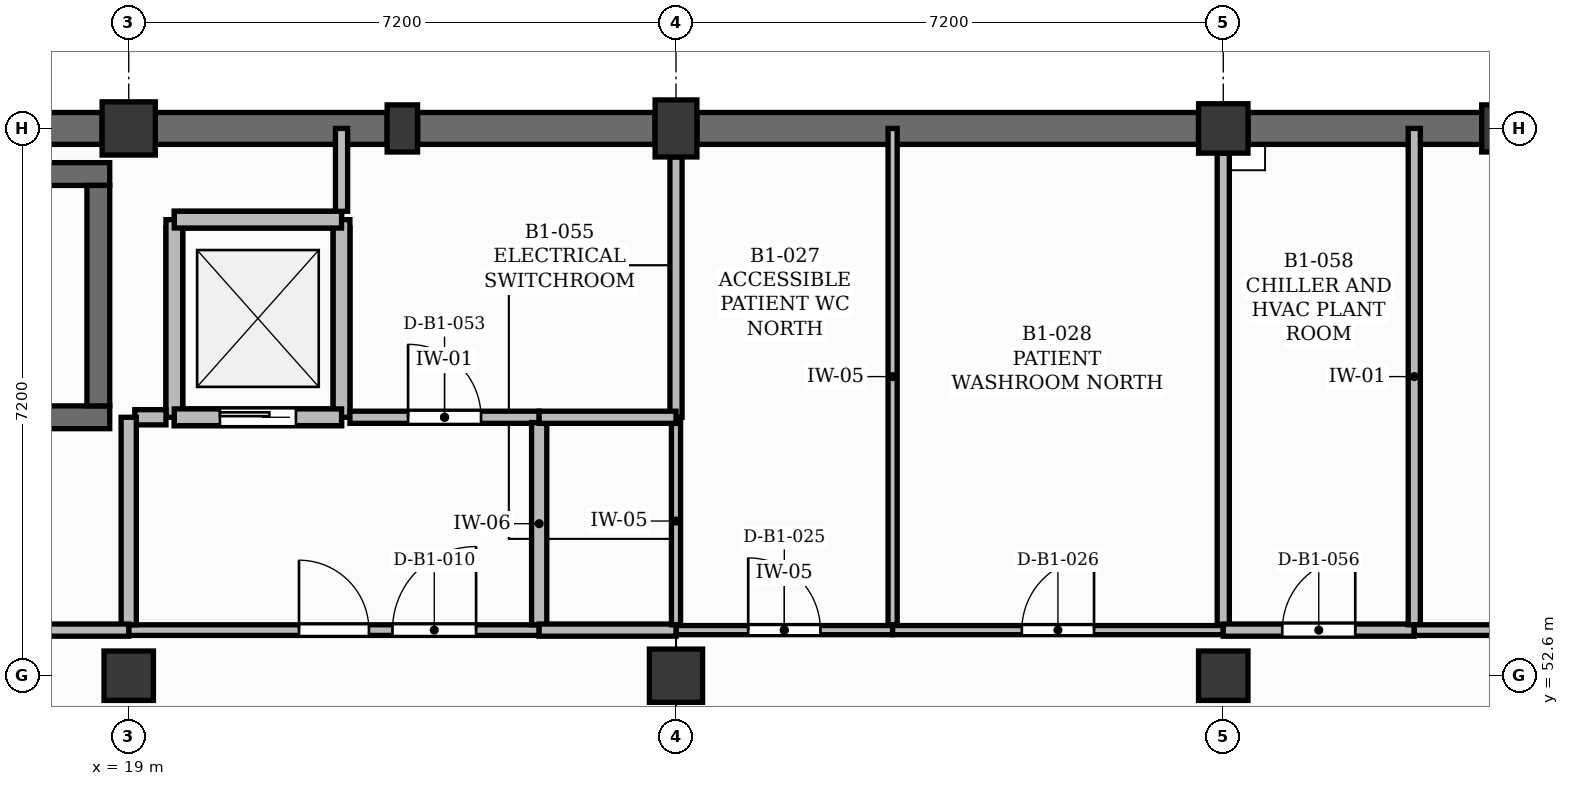
"""IFC4 building model, lengths in metres.
Left out: names, types, materials, properties, quantities, classifications, styles, units other than length and angle.
Written with IfcOpenShell. Run it as: python <this file> out.ifc"""

import sys

from ifc_helpers import new_model, si_unit, direction, frame, frame_2d, origin, origin_2d, place, context, subcontext, project, spatial, rectangle, extrude, element, fill, save


model = new_model("IFC4")
c1 = context("Model", 3, precision=1e-05, world=origin(), true_north=direction((0.0, 1.0)))
c2 = subcontext(c1, "Body", "Model", "MODEL_VIEW")
j1 = project(units=[si_unit("LENGTHUNIT", "METRE"), si_unit("PLANEANGLEUNIT", "RADIAN")], contexts=[c1])
p1 = place(None, origin())
s1 = spatial("IfcSite", under=j1, at=p1, CompositionType="ELEMENT")
p2 = place(p1, origin())
s2 = spatial("IfcBuilding", under=s1, at=p2, CompositionType="ELEMENT")
p3 = place(p2, frame((0.0, 0.0, -4.5)))
s3 = spatial("IfcBuildingStorey", under=s2, at=p3, CompositionType="ELEMENT", Elevation=-4.5)
p4 = place(p3, frame((19.0, 52.6, 0.0), z_axis=(0.0, 0.0, 1.0), x_axis=(1.0, 0.0, 0.0)))
e1 = element("IfcColumn", 1, at=p4, inside=s3, PredefinedType="COLUMN", context=c2, shape_type="SweptSolid", body=[
    extrude(rectangle(XDim=0.65, YDim=0.65, at=origin_2d()), origin(), (0.0, 0.0, 1.0), 4.2),
])
for number, where, z_axis, x_axis in (
    (2, (19.0, 59.8, 0.0), (0.0, 0.0, 1.0), (1.0, 0.0, 0.0)),
    (3, (26.2, 52.6, 0.0), (0.0, 0.0, 1.0), (1.0, 0.0, 0.0)),
):
    element("IfcColumn", number, at=place(p3, frame(where, z_axis=z_axis, x_axis=x_axis)), inside=s3, PredefinedType="COLUMN", context=c2, shape_type="SweptSolid", body=[
        extrude(rectangle(XDim=0.7, YDim=0.7, at=origin_2d()), origin(), (0.0, 0.0, 1.0), 4.2),
    ])
p5 = place(p3, frame((26.2, 59.8, 0.0), z_axis=(0.0, 0.0, 1.0), x_axis=(1.0, 0.0, 0.0)))
e4 = element("IfcColumn", 4, at=p5, inside=s3, PredefinedType="COLUMN", context=c2, shape_type="SweptSolid", body=[
    extrude(rectangle(XDim=0.55, YDim=0.75, at=origin_2d()), origin(), (0.0, 0.0, 1.0), 4.2),
])
for number, where, z_axis, x_axis in (
    (5, (33.4, 52.6, 0.0), (0.0, 0.0, 1.0), (1.0, 0.0, 0.0)),
    (6, (33.4, 59.8, 0.0), (0.0, 0.0, 1.0), (1.0, 0.0, 0.0)),
):
    element("IfcColumn", number, at=place(p3, frame(where, z_axis=z_axis, x_axis=x_axis)), inside=s3, PredefinedType="COLUMN", context=c2, shape_type="SweptSolid", body=[
        extrude(rectangle(XDim=0.65, YDim=0.65, at=origin_2d()), origin(), (0.0, 0.0, 1.0), 4.2),
    ])
for number, where, z_axis, x_axis in (
    (7, (22.6, 59.8, 0.0), (0.0, 0.0, 1.0), (1.0, 0.0, 0.0)),
    (8, (37.0, 59.8, 0.0), (0.0, 0.0, 1.0), (1.0, 0.0, 0.0)),
):
    element("IfcColumn", number, at=place(p3, frame(where, z_axis=z_axis, x_axis=x_axis)), inside=s3, PredefinedType="PILASTER", context=c2, shape_type="SweptSolid", body=[
        extrude(rectangle(XDim=0.4, YDim=0.62, at=origin_2d()), origin(), (0.0, 0.0, 1.0), 4.2),
    ])
p6 = place(p3, frame((12.075, 59.8, 0.0), z_axis=(0.0, 0.0, 1.0), x_axis=(1.0, 0.0, 0.0)))
e9 = element("IfcWall", 9, at=p6, inside=s3, PredefinedType="USERDEFINED", context=c2, shape_type="SweptSolid", body=[
    extrude(rectangle(XDim=6.575, YDim=0.42, at=frame_2d((3.288, 0.0))), origin(), (0.0, 0.0, 1.0), 4.2),
])
p7 = place(p3, frame((19.35, 59.8, 0.0), z_axis=(0.0, 0.0, 1.0), x_axis=(1.0, 0.0, 0.0)))
e10 = element("IfcWall", 10, at=p7, inside=s3, PredefinedType="USERDEFINED", context=c2, shape_type="SweptSolid", body=[
    extrude(rectangle(XDim=3.05, YDim=0.42, at=frame_2d((1.525, 0.0))), origin(), (0.0, 0.0, 1.0), 4.2),
])
p8 = place(p3, frame((22.8, 59.8, 0.0), z_axis=(0.0, 0.0, 1.0), x_axis=(1.0, 0.0, 0.0)))
e11 = element("IfcWall", 11, at=p8, inside=s3, PredefinedType="USERDEFINED", context=c2, shape_type="SweptSolid", body=[
    extrude(rectangle(XDim=3.125, YDim=0.42, at=frame_2d((1.562, 0.0))), origin(), (0.0, 0.0, 1.0), 4.2),
])
p9 = place(p3, frame((26.475, 59.8, 0.0), z_axis=(0.0, 0.0, 1.0), x_axis=(1.0, 0.0, 0.0)))
e12 = element("IfcWall", 12, at=p9, inside=s3, PredefinedType="USERDEFINED", context=c2, shape_type="SweptSolid", body=[
    extrude(rectangle(XDim=6.6, YDim=0.42, at=frame_2d((3.3, 0.0))), origin(), (0.0, 0.0, 1.0), 4.2),
])
p10 = place(p3, frame((33.725, 59.8, 0.0), z_axis=(0.0, 0.0, 1.0), x_axis=(1.0, 0.0, 0.0)))
e13 = element("IfcWall", 13, at=p10, inside=s3, PredefinedType="USERDEFINED", context=c2, shape_type="SweptSolid", body=[
    extrude(rectangle(XDim=3.075, YDim=0.42, at=frame_2d((1.538, 0.0))), origin(), (0.0, 0.0, 1.0), 4.2),
])
for number, where, z_axis, x_axis in (
    (14, (12.05, 56.0, 0.0), (0.0, 0.0, 1.0), (1.0, 0.0, 0.0)),
    (15, (12.05, 59.2, 0.0), (0.0, 0.0, 1.0), (1.0, 0.0, 0.0)),
):
    element("IfcWall", number, at=place(p3, frame(where, z_axis=z_axis, x_axis=x_axis)), inside=s3, PredefinedType="SHEAR", context=c2, shape_type="SweptSolid", body=[
        extrude(rectangle(XDim=6.7, YDim=0.3, at=frame_2d((3.35, 0.0))), origin(), (0.0, 0.0, 1.0), 4.25),
    ])
p11 = place(p3, frame((18.6, 56.15, 0.0), z_axis=(0.0, 0.0, 1.0), x_axis=(0.0, 1.0, 0.0)))
e16 = element("IfcWall", 16, at=p11, inside=s3, PredefinedType="SHEAR", context=c2, shape_type="SweptSolid", body=[
    extrude(rectangle(XDim=2.9, YDim=0.3, at=frame_2d((1.45, 0.0))), origin(), (0.0, 0.0, 1.0), 4.25),
])
p12 = place(p3, frame((19.6, 56.0, 0.0), z_axis=(0.0, 0.0, 1.0), x_axis=(1.0, 0.0, 0.0)))
e17 = element("IfcWall", 17, at=p12, inside=s3, PredefinedType="SOLIDWALL", context=c2, shape_type="SweptSolid", body=[
    extrude(rectangle(XDim=2.2, YDim=0.22, at=frame_2d((1.1, 0.0))), origin(), (0.0, 0.0, 1.0), 4.25),
])
p13 = place(p12, frame((0.6, 0.0, 0.0)))
e18 = element("IfcOpeningElement", 18, at=p13, cuts=e17, PredefinedType="OPENING", context=c2, shape_type="SweptSolid", body=[
    extrude(rectangle(XDim=1.0, YDim=2.15, at=frame_2d((0.5, 1.075))), frame((0.0, 0.12, 0.0), z_axis=(0.0, -1.0, 0.0), x_axis=(1.0, 0.0, 0.0)), (0.0, 0.0, 1.0), 0.24),
])
p14 = place(p3, frame((19.6, 58.6, 0.0), z_axis=(0.0, 0.0, 1.0), x_axis=(1.0, 0.0, 0.0)))
e19 = element("IfcWall", 19, at=p14, inside=s3, PredefinedType="SOLIDWALL", context=c2, shape_type="SweptSolid", body=[
    extrude(rectangle(XDim=2.2, YDim=0.22, at=frame_2d((1.1, 0.0))), origin(), (0.0, 0.0, 1.0), 4.25),
])
for number, where, z_axis, x_axis in (
    (20, (19.6, 56.11, 0.0), (0.0, 0.0, 1.0), (0.0, 1.0, 0.0)),
    (21, (21.8, 56.11, 0.0), (0.0, 0.0, 1.0), (0.0, 1.0, 0.0)),
):
    element("IfcWall", number, at=place(p3, frame(where, z_axis=z_axis, x_axis=x_axis)), inside=s3, PredefinedType="SOLIDWALL", context=c2, shape_type="SweptSolid", body=[
        extrude(rectangle(XDim=2.38, YDim=0.22, at=frame_2d((1.19, 0.0))), origin(), (0.0, 0.0, 1.0), 4.25),
    ])
for number, where, z_axis, x_axis in (
    (22, (19.6, 56.0, -0.9), (0.0, 0.0, 1.0), (0.0, 1.0, 0.0)),
    (23, (21.8, 56.0, -0.9), (0.0, 0.0, 1.0), (0.0, 1.0, 0.0)),
):
    element("IfcWall", number, at=place(p3, frame(where, z_axis=z_axis, x_axis=x_axis)), inside=s3, PredefinedType="SOLIDWALL", context=c2, shape_type="SweptSolid", body=[
        extrude(rectangle(XDim=2.6, YDim=0.22, at=frame_2d((1.3, 0.0))), origin(), (0.0, 0.0, 1.0), 0.9),
    ])
for number, where, z_axis, x_axis in (
    (24, (19.6, 56.0, -0.9), (0.0, 0.0, 1.0), (1.0, 0.0, 0.0)),
    (25, (19.6, 58.6, -0.9), (0.0, 0.0, 1.0), (1.0, 0.0, 0.0)),
):
    element("IfcWall", number, at=place(p3, frame(where, z_axis=z_axis, x_axis=x_axis)), inside=s3, PredefinedType="SOLIDWALL", context=c2, shape_type="SweptSolid", body=[
        extrude(rectangle(XDim=2.2, YDim=0.22, at=frame_2d((1.1, 0.0))), origin(), (0.0, 0.0, 1.0), 0.9),
    ])
p15 = place(p3, frame((19.0, 53.2, 0.0), z_axis=(0.0, 0.0, 1.0), x_axis=(1.0, 0.0, 0.0)))
e26 = element("IfcWall", 26, at=p15, inside=s3, PredefinedType="PARTITIONING", context=c2, shape_type="SweptSolid", body=[
    extrude(rectangle(XDim=5.4, YDim=0.14, at=frame_2d((2.7, 0.0))), origin(), (0.0, 0.0, 1.0), 4.08),
])
p16 = place(p15, frame((2.24, 0.0, 0.0)))
e27 = element("IfcOpeningElement", 27, at=p16, cuts=e26, PredefinedType="OPENING", context=c2, shape_type="SweptSolid", body=[
    extrude(rectangle(XDim=0.92, YDim=2.1, at=frame_2d((0.46, 1.05))), frame((0.0, 0.08, 0.0), z_axis=(0.0, -1.0, 0.0), x_axis=(1.0, 0.0, 0.0)), (0.0, 0.0, 1.0), 0.16),
])
p17 = place(p15, frame((3.47, 0.0, 0.0)))
e28 = element("IfcOpeningElement", 28, at=p17, cuts=e26, PredefinedType="OPENING", context=c2, shape_type="SweptSolid", body=[
    extrude(rectangle(XDim=1.1, YDim=2.1, at=frame_2d((0.55, 1.05))), frame((0.0, 0.08, 0.0), z_axis=(0.0, -1.0, 0.0), x_axis=(1.0, 0.0, 0.0)), (0.0, 0.0, 1.0), 0.16),
])
p18 = place(p3, frame((21.91, 56.0, 0.0), z_axis=(0.0, 0.0, 1.0), x_axis=(1.0, 0.0, 0.0)))
e29 = element("IfcWall", 29, at=p18, inside=s3, PredefinedType="PARTITIONING", context=c2, shape_type="SweptSolid", body=[
    extrude(rectangle(XDim=2.49, YDim=0.16, at=frame_2d((1.245, 0.0))), origin(), (0.0, 0.0, 1.0), 4.08),
])
p19 = place(p18, frame((0.765, 0.0, 0.0)))
e30 = element("IfcOpeningElement", 30, at=p19, cuts=e29, PredefinedType="OPENING", context=c2, shape_type="SweptSolid", body=[
    extrude(rectangle(XDim=0.96, YDim=2.1, at=frame_2d((0.48, 1.05))), frame((0.0, 0.09, 0.0), z_axis=(0.0, -1.0, 0.0), x_axis=(1.0, 0.0, 0.0)), (0.0, 0.0, 1.0), 0.18),
])
p20 = place(p3, frame((26.2, 53.2, 0.0), z_axis=(0.0, 0.0, 1.0), x_axis=(1.0, 0.0, 0.0)))
e31 = element("IfcWall", 31, at=p20, inside=s3, PredefinedType="PLUMBINGWALL", context=c2, shape_type="SweptSolid", body=[
    extrude(rectangle(XDim=2.85, YDim=0.12, at=frame_2d((1.425, 0.0))), origin(), (0.0, 0.0, 1.0), 4.08),
])
p21 = place(p20, frame((0.95, 0.0, 0.0)))
e32 = element("IfcOpeningElement", 32, at=p21, cuts=e31, PredefinedType="OPENING", context=c2, shape_type="SweptSolid", body=[
    extrude(rectangle(XDim=0.95, YDim=2.1, at=frame_2d((0.475, 1.05))), frame((0.0, 0.07, 0.0), z_axis=(0.0, -1.0, 0.0), x_axis=(1.0, 0.0, 0.0)), (0.0, 0.0, 1.0), 0.14),
])
p22 = place(p3, frame((26.2, 56.0, 0.0), z_axis=(0.0, 0.0, 1.0), x_axis=(0.0, 1.0, 0.0)))
e33 = element("IfcWall", 33, at=p22, inside=s3, PredefinedType="PARTITIONING", context=c2, shape_type="SweptSolid", body=[
    extrude(rectangle(XDim=3.425, YDim=0.16, at=frame_2d((1.712, 0.0))), origin(), (0.0, 0.0, 1.0), 3.5),
])
p23 = place(p3, frame((29.05, 53.27, 0.0), z_axis=(0.0, 0.0, 1.0), x_axis=(0.0, 1.0, 0.0)))
e34 = element("IfcWall", 34, at=p23, inside=s3, PredefinedType="PLUMBINGWALL", context=c2, shape_type="SweptSolid", body=[
    extrude(rectangle(XDim=6.53, YDim=0.12, at=frame_2d((3.265, 0.0))), origin(), (0.0, 0.0, 1.0), 4.08),
])
p24 = place(p3, frame((29.05, 53.2, 0.0), z_axis=(0.0, 0.0, 1.0), x_axis=(1.0, 0.0, 0.0)))
e35 = element("IfcWall", 35, at=p24, inside=s3, PredefinedType="PLUMBINGWALL", context=c2, shape_type="SweptSolid", body=[
    extrude(rectangle(XDim=4.35, YDim=0.12, at=frame_2d((2.175, 0.0))), origin(), (0.0, 0.0, 1.0), 4.08),
])
p25 = place(p24, frame((1.7, 0.0, 0.0)))
e36 = element("IfcOpeningElement", 36, at=p25, cuts=e35, PredefinedType="OPENING", context=c2, shape_type="SweptSolid", body=[
    extrude(rectangle(XDim=0.95, YDim=2.1, at=frame_2d((0.475, 1.05))), frame((0.0, 0.07, 0.0), z_axis=(0.0, -1.0, 0.0), x_axis=(1.0, 0.0, 0.0)), (0.0, 0.0, 1.0), 0.14),
])
p26 = place(p3, frame((33.4, 53.27, 0.0), z_axis=(0.0, 0.0, 1.0), x_axis=(0.0, 1.0, 0.0)))
e37 = element("IfcWall", 37, at=p26, inside=s3, PredefinedType="PARTITIONING", context=c2, shape_type="SweptSolid", body=[
    extrude(rectangle(XDim=6.205, YDim=0.16, at=frame_2d((3.103, 0.0))), origin(), (0.0, 0.0, 1.0), 3.5),
])
p27 = place(p3, frame((33.4, 53.2, 0.0), z_axis=(0.0, 0.0, 1.0), x_axis=(1.0, 0.0, 0.0)))
e38 = element("IfcWall", 38, at=p27, inside=s3, PredefinedType="PARTITIONING", context=c2, shape_type="SweptSolid", body=[
    extrude(rectangle(XDim=2.513, YDim=0.16, at=frame_2d((1.257, 0.0))), origin(), (0.0, 0.0, 1.0), 4.08),
])
p28 = place(p27, frame((0.777, 0.0, 0.0)))
e39 = element("IfcOpeningElement", 39, at=p28, cuts=e38, PredefinedType="OPENING", context=c2, shape_type="SweptSolid", body=[
    extrude(rectangle(XDim=0.96, YDim=2.1, at=frame_2d((0.48, 1.05))), frame((0.0, 0.09, 0.0), z_axis=(0.0, -1.0, 0.0), x_axis=(1.0, 0.0, 0.0)), (0.0, 0.0, 1.0), 0.18),
])
p29 = place(p3, frame((35.913, 53.27, 0.0), z_axis=(0.0, 0.0, 1.0), x_axis=(0.0, 1.0, 0.0)))
e40 = element("IfcWall", 40, at=p29, inside=s3, PredefinedType="PARTITIONING", context=c2, shape_type="SweptSolid", body=[
    extrude(rectangle(XDim=6.53, YDim=0.16, at=frame_2d((3.265, 0.0))), origin(), (0.0, 0.0, 1.0), 4.08),
])
p30 = place(p3, frame((35.913, 53.2, 0.0), z_axis=(0.0, 0.0, 1.0), x_axis=(1.0, 0.0, 0.0)))
e41 = element("IfcWall", 41, at=p30, inside=s3, PredefinedType="PARTITIONING", context=c2, shape_type="SweptSolid", body=[
    extrude(rectangle(XDim=4.687, YDim=0.14, at=frame_2d((2.344, 0.0))), origin(), (0.0, 0.0, 1.0), 4.08),
])
p31 = place(p30, frame((1.513, 0.0, 0.0)))
e42 = element("IfcOpeningElement", 42, at=p31, cuts=e41, PredefinedType="OPENING", context=c2, shape_type="SweptSolid", body=[
    extrude(rectangle(XDim=1.66, YDim=2.3, at=frame_2d((0.83, 1.15))), frame((0.0, 0.08, 0.0), z_axis=(0.0, -1.0, 0.0), x_axis=(1.0, 0.0, 0.0)), (0.0, 0.0, 1.0), 0.16),
])
p32 = place(p3, frame((24.4, 53.27, 0.0), z_axis=(0.0, 0.0, 1.0), x_axis=(0.0, 1.0, 0.0)))
e43 = element("IfcWall", 43, at=p32, inside=s3, PredefinedType="PARTITIONING", context=c2, shape_type="SweptSolid", body=[
    extrude(rectangle(XDim=2.66, YDim=0.2, at=frame_2d((1.33, 0.0))), origin(), (0.0, 0.0, 1.0), 4.08),
])
p33 = place(p3, frame((19.49, 56.0, 0.0), z_axis=(0.0, 0.0, 1.0), x_axis=(-1.0, 0.0, 0.0)))
e44 = element("IfcWall", 44, at=p33, inside=s3, PredefinedType="PARTITIONING", context=c2, shape_type="SweptSolid", body=[
    extrude(rectangle(XDim=0.41, YDim=0.2, at=frame_2d((0.205, 0.0))), origin(), (0.0, 0.0, 1.0), 4.08),
])
p34 = place(p3, frame((19.0, 53.27, 0.0), z_axis=(0.0, 0.0, 1.0), x_axis=(0.0, 1.0, 0.0)))
e45 = element("IfcWall", 45, at=p34, inside=s3, PredefinedType="PARTITIONING", context=c2, shape_type="SweptSolid", body=[
    extrude(rectangle(XDim=2.73, YDim=0.2, at=frame_2d((1.365, 0.0))), origin(), (0.0, 0.0, 1.0), 3.5),
])
p35 = place(p3, frame((26.2, 53.2, 0.0), z_axis=(0.0, 0.0, 1.0), x_axis=(-1.0, 0.0, 0.0)))
e46 = element("IfcWall", 46, at=p35, inside=s3, PredefinedType="PARTITIONING", context=c2, shape_type="SweptSolid", body=[
    extrude(rectangle(XDim=1.8, YDim=0.16, at=frame_2d((0.9, 0.0))), origin(), (0.0, 0.0, 1.0), 4.08),
])
p36 = place(p3, frame((19.0, 53.2, 0.0), z_axis=(0.0, 0.0, 1.0), x_axis=(-1.0, 0.0, 0.0)))
e47 = element("IfcWall", 47, at=p36, inside=s3, PredefinedType="PARTITIONING", context=c2, shape_type="SweptSolid", body=[
    extrude(rectangle(XDim=2.8, YDim=0.16, at=frame_2d((1.4, 0.0))), origin(), (0.0, 0.0, 1.0), 4.08),
])
p37 = place(p3, frame((26.2, 53.27, 0.0), z_axis=(0.0, 0.0, 1.0), x_axis=(0.0, 1.0, 0.0)))
e48 = element("IfcWall", 48, at=p37, inside=s3, PredefinedType="PLUMBINGWALL", context=c2, shape_type="SweptSolid", body=[
    extrude(rectangle(XDim=2.73, YDim=0.12, at=frame_2d((1.365, 0.0))), origin(), (0.0, 0.0, 1.0), 3.5),
])
p38 = place(p3, frame((24.4, 56.0, 0.0), z_axis=(0.0, 0.0, 1.0), x_axis=(1.0, 0.0, 0.0)))
e49 = element("IfcWall", 49, at=p38, inside=s3, PredefinedType="PARTITIONING", context=c2, shape_type="SweptSolid", body=[
    extrude(rectangle(XDim=1.8, YDim=0.16, at=frame_2d((0.9, 0.0))), origin(), (0.0, 0.0, 1.0), 4.08),
])
p39 = place(p3, frame((21.8, 58.71, 0.0), z_axis=(0.0, 0.0, 1.0), x_axis=(0.0, 1.0, 0.0)))
e50 = element("IfcWall", 50, at=p39, inside=s3, PredefinedType="PARTITIONING", context=c2, shape_type="SweptSolid", body=[
    extrude(rectangle(XDim=1.09, YDim=0.16, at=frame_2d((0.545, 0.0))), origin(), (0.0, 0.0, 1.0), 4.08),
])
p40 = place(p13, origin())
e51 = element("IfcDoor", 51, at=p40, inside=s3, OperationType="SLIDING_TO_LEFT", PredefinedType="DOOR", context=c2, shape_type="SweptSolid", body=[
    extrude(rectangle(XDim=1.0, YDim=2.15, at=frame_2d((0.5, 1.075))), frame((0.0, 0.025, 0.0), z_axis=(0.0, -1.0, 0.0), x_axis=(1.0, 0.0, 0.0)), (0.0, 0.0, 1.0), 0.05),
])
fill(e18, e51)
p41 = place(p16, origin())
e52 = element("IfcDoor", 52, at=p41, inside=s3, OperationType="SINGLE_SWING_LEFT", PredefinedType="DOOR", context=c2, shape_type="SweptSolid", body=[
    extrude(rectangle(XDim=0.92, YDim=2.1, at=frame_2d((0.46, 1.05))), frame((0.0, 0.025, 0.0), z_axis=(0.0, -1.0, 0.0), x_axis=(1.0, 0.0, 0.0)), (0.0, 0.0, 1.0), 0.05),
])
fill(e27, e52)
p42 = place(p17, origin())
e53 = element("IfcDoor", 53, at=p42, inside=s3, OperationType="SINGLE_SWING_RIGHT", PredefinedType="DOOR", context=c2, shape_type="SweptSolid", body=[
    extrude(rectangle(XDim=1.1, YDim=2.1, at=frame_2d((0.55, 1.05))), frame((0.0, 0.025, 0.0), z_axis=(0.0, -1.0, 0.0), x_axis=(1.0, 0.0, 0.0)), (0.0, 0.0, 1.0), 0.05),
])
fill(e28, e53)
p43 = place(p21, origin())
e54 = element("IfcDoor", 54, at=p43, inside=s3, OperationType="SINGLE_SWING_LEFT", PredefinedType="DOOR", context=c2, shape_type="SweptSolid", body=[
    extrude(rectangle(XDim=0.95, YDim=2.1, at=frame_2d((0.475, 1.05))), frame((0.0, 0.025, 0.0), z_axis=(0.0, -1.0, 0.0), x_axis=(1.0, 0.0, 0.0)), (0.0, 0.0, 1.0), 0.05),
])
fill(e32, e54)
p44 = place(p25, origin())
e55 = element("IfcDoor", 55, at=p44, inside=s3, OperationType="SINGLE_SWING_RIGHT", PredefinedType="DOOR", context=c2, shape_type="SweptSolid", body=[
    extrude(rectangle(XDim=0.95, YDim=2.1, at=frame_2d((0.475, 1.05))), frame((0.0, 0.025, 0.0), z_axis=(0.0, -1.0, 0.0), x_axis=(1.0, 0.0, 0.0)), (0.0, 0.0, 1.0), 0.05),
])
fill(e36, e55)
p45 = place(p19, origin())
e56 = element("IfcDoor", 56, at=p45, inside=s3, OperationType="SINGLE_SWING_LEFT", PredefinedType="DOOR", context=c2, shape_type="SweptSolid", body=[
    extrude(rectangle(XDim=0.96, YDim=2.1, at=frame_2d((0.48, 1.05))), frame((0.0, 0.025, 0.0), z_axis=(0.0, -1.0, 0.0), x_axis=(1.0, 0.0, 0.0)), (0.0, 0.0, 1.0), 0.05),
])
fill(e30, e56)
p46 = place(p28, origin())
e57 = element("IfcDoor", 57, at=p46, inside=s3, OperationType="SINGLE_SWING_RIGHT", PredefinedType="DOOR", context=c2, shape_type="SweptSolid", body=[
    extrude(rectangle(XDim=0.96, YDim=2.1, at=frame_2d((0.48, 1.05))), frame((0.0, 0.025, 0.0), z_axis=(0.0, -1.0, 0.0), x_axis=(1.0, 0.0, 0.0)), (0.0, 0.0, 1.0), 0.05),
])
fill(e39, e57)
save(model, sys.argv[1])
